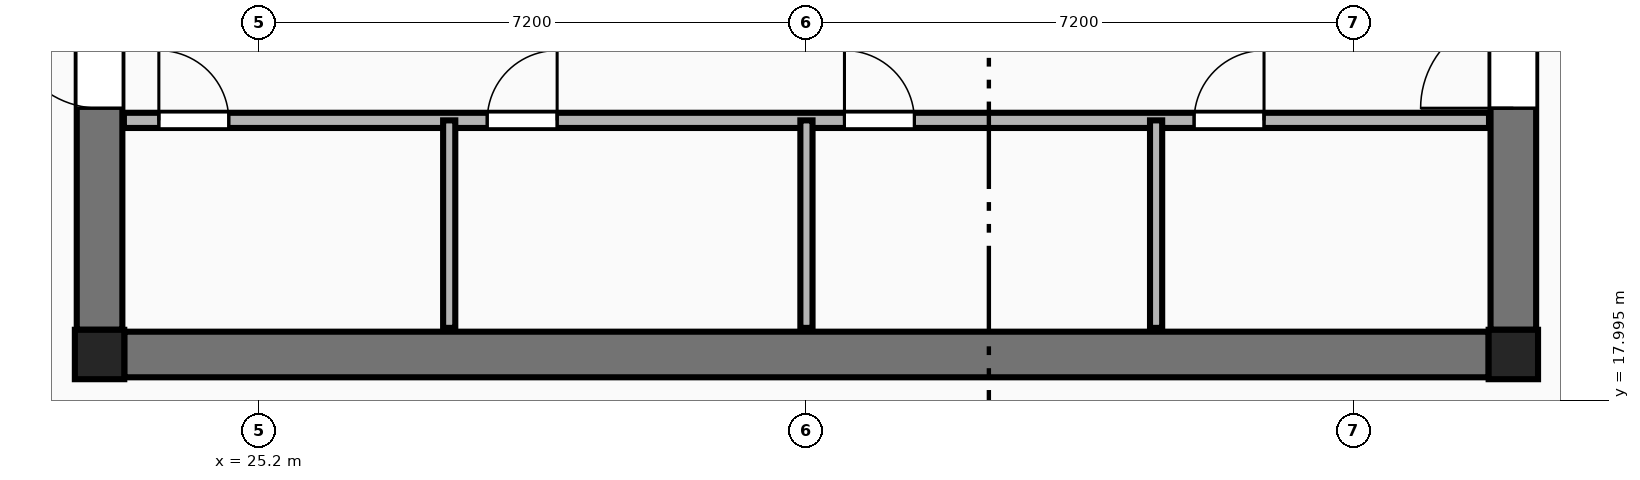
"""IFC4 building model, lengths in metres.
Left out: names, types, materials, properties, quantities, classifications, styles, units other than length and angle.
Written with IfcOpenShell. Run it as: python <this file> out.ifc"""

import sys

from ifc_helpers import new_model, si_unit, direction, frame, frame_2d, origin, origin_2d, place, context, subcontext, project, spatial, rectangle, extrude, element, fill, save


model = new_model("IFC4")
c1 = context("Model", 3, precision=1e-05, world=origin(), true_north=direction((0.0, 1.0)))
c2 = subcontext(c1, "Body", "Model", "MODEL_VIEW")
j1 = project(units=[si_unit("LENGTHUNIT", "METRE"), si_unit("PLANEANGLEUNIT", "RADIAN")], contexts=[c1])
p1 = place(None, origin())
s1 = spatial("IfcSite", under=j1, at=p1, CompositionType="ELEMENT")
p2 = place(p1, origin())
s2 = spatial("IfcBuilding", under=s1, at=p2, CompositionType="ELEMENT")
p3 = place(p2, frame((0.0, 0.0, 210.95)))
s3 = spatial("IfcBuildingStorey", under=s2, at=p3, CompositionType="ELEMENT", Elevation=210.95)
for number, where, z_axis, x_axis in (
    (1, (23.1, 18.6, 0.0), (0.0, 0.0, 1.0), (1.0, 0.0, 0.0)),
    (2, (41.7, 18.6, 0.0), (0.0, 0.0, 1.0), (1.0, 0.0, 0.0)),
):
    element("IfcColumn", number, at=place(p3, frame(where, z_axis=z_axis, x_axis=x_axis)), inside=s3, PredefinedType="COLUMN", context=c2, shape_type="SweptSolid", body=[
        extrude(rectangle(XDim=0.65, YDim=0.65, at=origin_2d()), origin(), (0.0, 0.0, 1.0), 3.55),
    ])
p4 = place(p3, frame((23.425, 18.6, 0.0), z_axis=(0.0, 0.0, 1.0), x_axis=(1.0, 0.0, 0.0)))
e3 = element("IfcWall", 3, at=p4, inside=s3, PredefinedType="SHEAR", context=c2, shape_type="SweptSolid", body=[
    extrude(rectangle(XDim=17.95, YDim=0.6, at=frame_2d((8.975, 0.0))), origin(), (0.0, 0.0, 1.0), 3.35),
])
p5 = place(p3, frame((23.1, 18.925, 0.0), z_axis=(0.0, 0.0, 1.0), x_axis=(0.0, 1.0, 0.0)))
e4 = element("IfcWall", 4, at=p5, inside=s3, PredefinedType="SHEAR", context=c2, shape_type="SweptSolid", body=[
    extrude(rectangle(XDim=13.95, YDim=0.6, at=frame_2d((6.975, 0.0))), origin(), (0.0, 0.0, 1.0), 3.35),
])
p6 = place(p5, frame((2.915, 0.0, 0.0)))
e5 = element("IfcOpeningElement", 5, at=p6, cuts=e4, PredefinedType="OPENING", context=c2, shape_type="SweptSolid", body=[
    extrude(rectangle(XDim=1.22, YDim=2.25, at=frame_2d((0.61, 1.125))), frame((0.0, 0.31, 0.0), z_axis=(0.0, -1.0, 0.0), x_axis=(1.0, 0.0, 0.0)), (0.0, 0.0, 1.0), 0.62),
])
p7 = place(p3, frame((41.7, 18.925, 0.0), z_axis=(0.0, 0.0, 1.0), x_axis=(0.0, 1.0, 0.0)))
e6 = element("IfcWall", 6, at=p7, inside=s3, PredefinedType="SHEAR", context=c2, shape_type="SweptSolid", body=[
    extrude(rectangle(XDim=13.95, YDim=0.6, at=frame_2d((6.975, 0.0))), origin(), (0.0, 0.0, 1.0), 3.35),
])
p8 = place(p7, frame((2.915, 0.0, 0.0)))
e7 = element("IfcOpeningElement", 7, at=p8, cuts=e6, PredefinedType="OPENING", context=c2, shape_type="SweptSolid", body=[
    extrude(rectangle(XDim=1.22, YDim=2.25, at=frame_2d((0.61, 1.125))), frame((0.0, 0.31, 0.0), z_axis=(0.0, -1.0, 0.0), x_axis=(1.0, 0.0, 0.0)), (0.0, 0.0, 1.0), 0.62),
])
p9 = place(p3, frame((23.42, 21.68, 0.0), z_axis=(0.0, 0.0, 1.0), x_axis=(1.0, 0.0, 0.0)))
e8 = element("IfcWall", 8, at=p9, inside=s3, PredefinedType="PLUMBINGWALL", context=c2, shape_type="SweptSolid", body=[
    extrude(rectangle(XDim=17.96, YDim=0.2, at=frame_2d((8.98, 0.0))), origin(), (0.0, 0.0, 1.0), 3.35),
])
p10 = place(p9, frame((0.46, 0.0, 0.0)))
e9 = element("IfcOpeningElement", 9, at=p10, cuts=e8, PredefinedType="OPENING", context=c2, shape_type="SweptSolid", body=[
    extrude(rectangle(XDim=0.92, YDim=2.15, at=frame_2d((0.46, 1.075))), frame((0.0, 0.11, 0.0), z_axis=(0.0, -1.0, 0.0), x_axis=(1.0, 0.0, 0.0)), (0.0, 0.0, 1.0), 0.22),
])
p11 = place(p9, frame((4.78, 0.0, 0.0)))
e10 = element("IfcOpeningElement", 10, at=p11, cuts=e8, PredefinedType="OPENING", context=c2, shape_type="SweptSolid", body=[
    extrude(rectangle(XDim=0.92, YDim=2.15, at=frame_2d((0.46, 1.075))), frame((0.0, 0.11, 0.0), z_axis=(0.0, -1.0, 0.0), x_axis=(1.0, 0.0, 0.0)), (0.0, 0.0, 1.0), 0.22),
])
p12 = place(p9, frame((9.48, 0.0, 0.0)))
e11 = element("IfcOpeningElement", 11, at=p12, cuts=e8, PredefinedType="OPENING", context=c2, shape_type="SweptSolid", body=[
    extrude(rectangle(XDim=0.92, YDim=2.15, at=frame_2d((0.46, 1.075))), frame((0.0, 0.11, 0.0), z_axis=(0.0, -1.0, 0.0), x_axis=(1.0, 0.0, 0.0)), (0.0, 0.0, 1.0), 0.22),
])
p13 = place(p9, frame((14.08, 0.0, 0.0)))
e12 = element("IfcOpeningElement", 12, at=p13, cuts=e8, PredefinedType="OPENING", context=c2, shape_type="SweptSolid", body=[
    extrude(rectangle(XDim=0.92, YDim=2.15, at=frame_2d((0.46, 1.075))), frame((0.0, 0.11, 0.0), z_axis=(0.0, -1.0, 0.0), x_axis=(1.0, 0.0, 0.0)), (0.0, 0.0, 1.0), 0.22),
])
for number, where, z_axis, x_axis in (
    (13, (27.7, 18.95, 0.0), (0.0, 0.0, 1.0), (0.0, 1.0, 0.0)),
    (14, (32.4, 18.95, 0.0), (0.0, 0.0, 1.0), (0.0, 1.0, 0.0)),
    (15, (37.0, 18.95, 0.0), (0.0, 0.0, 1.0), (0.0, 1.0, 0.0)),
):
    element("IfcWall", number, at=place(p3, frame(where, z_axis=z_axis, x_axis=x_axis)), inside=s3, PredefinedType="PARTITIONING", context=c2, shape_type="SweptSolid", body=[
        extrude(rectangle(XDim=2.73, YDim=0.16, at=frame_2d((1.365, 0.0))), origin(), (0.0, 0.0, 1.0), 3.35),
    ])
p14 = place(p6, origin())
e16 = element("IfcDoor", 16, at=p14, inside=s3, OperationType="SINGLE_SWING_RIGHT", PredefinedType="DOOR", context=c2, shape_type="SweptSolid", body=[
    extrude(rectangle(XDim=1.22, YDim=2.25, at=frame_2d((0.61, 1.125))), frame((0.0, 0.025, 0.0), z_axis=(0.0, -1.0, 0.0), x_axis=(1.0, 0.0, 0.0)), (0.0, 0.0, 1.0), 0.05),
])
fill(e5, e16)
p15 = place(p8, origin())
e17 = element("IfcDoor", 17, at=p15, inside=s3, OperationType="SINGLE_SWING_LEFT", PredefinedType="DOOR", context=c2, shape_type="SweptSolid", body=[
    extrude(rectangle(XDim=1.22, YDim=2.25, at=frame_2d((0.61, 1.125))), frame((0.0, 0.025, 0.0), z_axis=(0.0, -1.0, 0.0), x_axis=(1.0, 0.0, 0.0)), (0.0, 0.0, 1.0), 0.05),
])
fill(e7, e17)
p16 = place(p10, origin())
e18 = element("IfcDoor", 18, at=p16, inside=s3, OperationType="SINGLE_SWING_LEFT", PredefinedType="DOOR", context=c2, shape_type="SweptSolid", body=[
    extrude(rectangle(XDim=0.92, YDim=2.15, at=frame_2d((0.46, 1.075))), frame((0.0, 0.025, 0.0), z_axis=(0.0, -1.0, 0.0), x_axis=(1.0, 0.0, 0.0)), (0.0, 0.0, 1.0), 0.05),
])
fill(e9, e18)
p17 = place(p11, origin())
e19 = element("IfcDoor", 19, at=p17, inside=s3, OperationType="SINGLE_SWING_RIGHT", PredefinedType="DOOR", context=c2, shape_type="SweptSolid", body=[
    extrude(rectangle(XDim=0.92, YDim=2.15, at=frame_2d((0.46, 1.075))), frame((0.0, 0.025, 0.0), z_axis=(0.0, -1.0, 0.0), x_axis=(1.0, 0.0, 0.0)), (0.0, 0.0, 1.0), 0.05),
])
fill(e10, e19)
p18 = place(p12, origin())
e20 = element("IfcDoor", 20, at=p18, inside=s3, OperationType="SINGLE_SWING_LEFT", PredefinedType="DOOR", context=c2, shape_type="SweptSolid", body=[
    extrude(rectangle(XDim=0.92, YDim=2.15, at=frame_2d((0.46, 1.075))), frame((0.0, 0.025, 0.0), z_axis=(0.0, -1.0, 0.0), x_axis=(1.0, 0.0, 0.0)), (0.0, 0.0, 1.0), 0.05),
])
fill(e11, e20)
p19 = place(p13, origin())
e21 = element("IfcDoor", 21, at=p19, inside=s3, OperationType="SINGLE_SWING_RIGHT", PredefinedType="DOOR", context=c2, shape_type="SweptSolid", body=[
    extrude(rectangle(XDim=0.92, YDim=2.15, at=frame_2d((0.46, 1.075))), frame((0.0, 0.025, 0.0), z_axis=(0.0, -1.0, 0.0), x_axis=(1.0, 0.0, 0.0)), (0.0, 0.0, 1.0), 0.05),
])
fill(e12, e21)
save(model, sys.argv[1])
